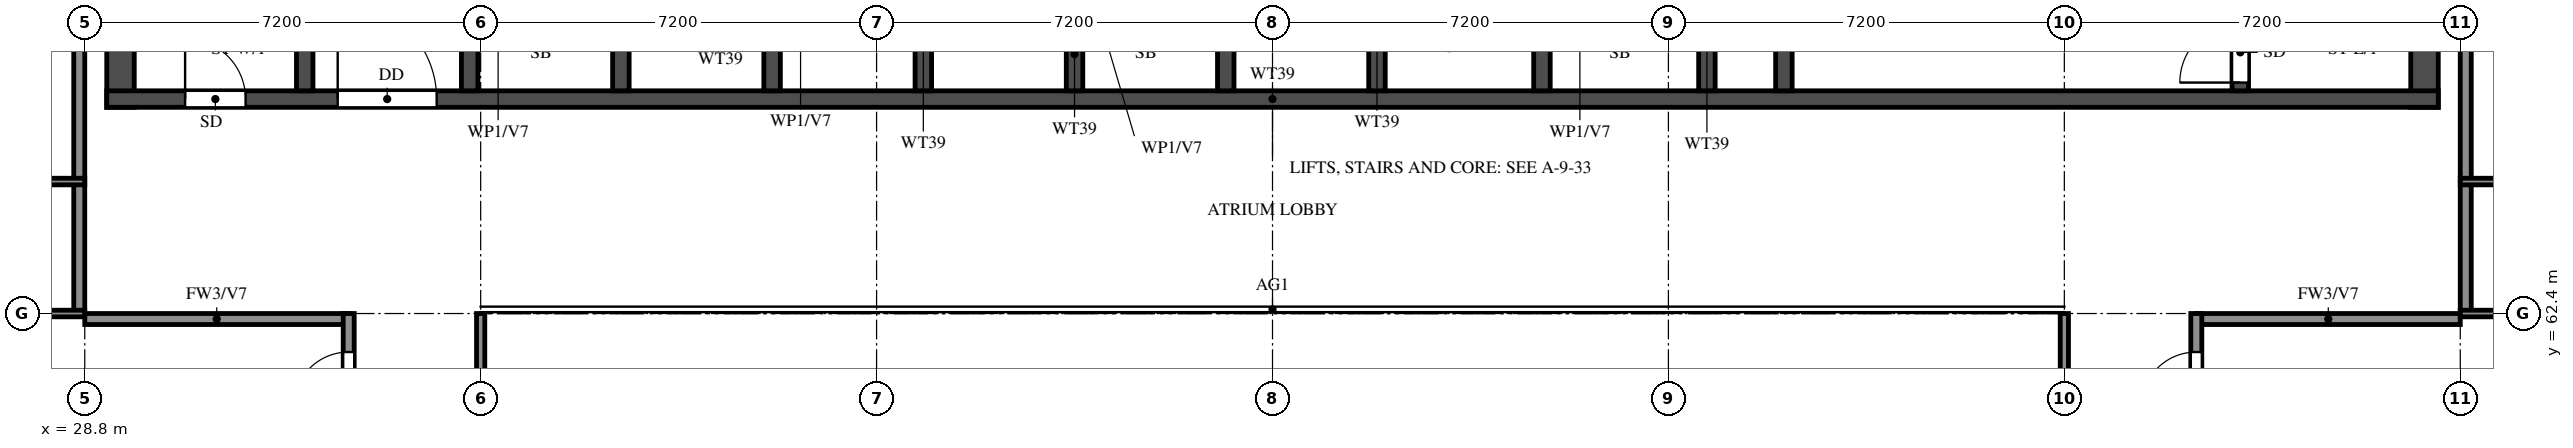
"""IFC4 building model, lengths in metres.
Left out: names, types, materials, properties, quantities, classifications, styles, units other than length and angle.
Written with IfcOpenShell. Run it as: python <this file> out.ifc"""

import sys

from ifc_helpers import new_model, si_unit, direction, frame, frame_2d, origin, place, context, subcontext, project, spatial, rectangle, extrude, element, fill, save


model = new_model("IFC4")
c1 = context("Model", 3, precision=1e-05, world=origin(), true_north=direction((0.0, 1.0)))
c2 = subcontext(c1, "Body", "Model", "MODEL_VIEW")
j1 = project(units=[si_unit("LENGTHUNIT", "METRE"), si_unit("PLANEANGLEUNIT", "RADIAN")], contexts=[c1])
p1 = place(None, origin())
s1 = spatial("IfcSite", under=j1, at=p1, CompositionType="ELEMENT")
p2 = place(p1, origin())
s2 = spatial("IfcBuilding", under=s1, at=p2, CompositionType="ELEMENT")
p3 = place(p2, frame((0.0, 0.0, 267.5)))
s3 = spatial("IfcBuildingStorey", under=s2, at=p3, CompositionType="ELEMENT", Elevation=267.5)
for number, where, z_axis, x_axis in (
    (1, (29.45, 66.15, 0.0), (0.0, 0.0, 1.0), (0.0, 1.0, 0.0)),
    (2, (71.35, 66.15, 0.0), (0.0, 0.0, 1.0), (0.0, 1.0, 0.0)),
):
    element("IfcWall", number, at=place(p3, frame(where, z_axis=z_axis, x_axis=x_axis)), inside=s3, PredefinedType="SHEAR", context=c2, shape_type="SweptSolid", body=[
        extrude(rectangle(XDim=11.85, YDim=0.5, at=frame_2d((5.925, 0.0))), origin(), (0.0, 0.0, 1.0), 3.099),
    ])
p4 = place(p3, frame((29.2, 66.3, 0.0), z_axis=(0.0, 0.0, 1.0), x_axis=(1.0, 0.0, 0.0)))
e3 = element("IfcWall", 3, at=p4, inside=s3, PredefinedType="SHEAR", context=c2, shape_type="SweptSolid", body=[
    extrude(rectangle(XDim=42.4, YDim=0.3, at=frame_2d((21.2, 0.0))), origin(), (0.0, 0.0, 1.0), 3.099),
])
p5 = place(p4, frame((1.425, 0.0, 0.0)))
e4 = element("IfcOpeningElement", 4, at=p5, cuts=e3, PredefinedType="OPENING", context=c2, shape_type="SweptSolid", body=[
    extrude(rectangle(XDim=1.1, YDim=2.1, at=frame_2d((0.55, 1.05))), frame((0.0, 0.16, 0.0), z_axis=(0.0, -1.0, 0.0), x_axis=(1.0, 0.0, 0.0)), (0.0, 0.0, 1.0), 0.32),
])
p6 = place(p4, frame((4.2, 0.0, 0.0)))
e5 = element("IfcOpeningElement", 5, at=p6, cuts=e3, PredefinedType="OPENING", context=c2, shape_type="SweptSolid", body=[
    extrude(rectangle(XDim=1.8, YDim=2.1, at=frame_2d((0.9, 1.05))), frame((0.0, 0.16, 0.0), z_axis=(0.0, -1.0, 0.0), x_axis=(1.0, 0.0, 0.0)), (0.0, 0.0, 1.0), 0.32),
])
p7 = place(p3, frame((32.8, 66.45, 0.0), z_axis=(0.0, 0.0, 1.0), x_axis=(0.0, 1.0, 0.0)))
e6 = element("IfcWall", 6, at=p7, inside=s3, PredefinedType="SHEAR", context=c2, shape_type="SweptSolid", body=[
    extrude(rectangle(XDim=11.05, YDim=0.3, at=frame_2d((5.525, 0.0))), origin(), (0.0, 0.0, 1.0), 3.099),
])
p8 = place(p3, frame((68.0, 66.45, 0.0), z_axis=(0.0, 0.0, 1.0), x_axis=(0.0, 1.0, 0.0)))
e7 = element("IfcWall", 7, at=p8, inside=s3, PredefinedType="SHEAR", context=c2, shape_type="SweptSolid", body=[
    extrude(rectangle(XDim=11.05, YDim=0.3, at=frame_2d((5.525, 0.0))), origin(), (0.0, 0.0, 1.0), 3.099),
])
p9 = place(p8, frame((0.15, 0.0, 0.0)))
e8 = element("IfcOpeningElement", 8, at=p9, cuts=e7, PredefinedType="OPENING", context=c2, shape_type="SweptSolid", body=[
    extrude(rectangle(XDim=1.1, YDim=2.1, at=frame_2d((0.55, 1.05))), frame((0.0, 0.16, 0.0), z_axis=(0.0, -1.0, 0.0), x_axis=(1.0, 0.0, 0.0)), (0.0, 0.0, 1.0), 0.32),
])
p10 = place(p3, frame((59.7, 66.45, 0.0), z_axis=(0.0, 0.0, 1.0), x_axis=(0.0, 1.0, 0.0)))
e9 = element("IfcWall", 9, at=p10, inside=s3, PredefinedType="SHEAR", context=c2, shape_type="SweptSolid", body=[
    extrude(rectangle(XDim=6.175, YDim=0.3, at=frame_2d((3.087, 0.0))), origin(), (0.0, 0.0, 1.0), 3.099),
])
p11 = place(p10, frame((3.85, 0.0, 0.0)))
e10 = element("IfcOpeningElement", 10, at=p11, cuts=e9, PredefinedType="OPENING", context=c2, shape_type="SweptSolid", body=[
    extrude(rectangle(XDim=1.2, YDim=2.1, at=frame_2d((0.6, 1.05))), frame((0.0, 0.16, 0.0), z_axis=(0.0, -1.0, 0.0), x_axis=(1.0, 0.0, 0.0)), (0.0, 0.0, 1.0), 0.32),
])
for number, where, z_axis, x_axis in (
    (11, (35.8, 66.45, 0.0), (0.0, 0.0, 1.0), (0.0, 1.0, 0.0)),
    (12, (38.55, 66.45, 0.0), (0.0, 0.0, 1.0), (0.0, 1.0, 0.0)),
    (13, (41.3, 66.45, 0.0), (0.0, 0.0, 1.0), (0.0, 1.0, 0.0)),
    (14, (44.05, 66.45, 0.0), (0.0, 0.0, 1.0), (0.0, 1.0, 0.0)),
    (15, (46.8, 66.45, 0.0), (0.0, 0.0, 1.0), (0.0, 1.0, 0.0)),
    (16, (49.55, 66.45, 0.0), (0.0, 0.0, 1.0), (0.0, 1.0, 0.0)),
    (17, (52.3, 66.45, 0.0), (0.0, 0.0, 1.0), (0.0, 1.0, 0.0)),
    (18, (55.3, 66.45, 0.0), (0.0, 0.0, 1.0), (0.0, 1.0, 0.0)),
    (19, (58.3, 66.45, 0.0), (0.0, 0.0, 1.0), (0.0, 1.0, 0.0)),
):
    element("IfcWall", number, at=place(p3, frame(where, z_axis=z_axis, x_axis=x_axis)), inside=s3, PredefinedType="SHEAR", context=c2, shape_type="SweptSolid", body=[
        extrude(rectangle(XDim=2.425, YDim=0.3, at=frame_2d((1.212, 0.0))), origin(), (0.0, 0.0, 1.0), 3.099),
    ])
for number, where, z_axis, x_axis in (
    (20, (28.8, 62.3, 0.0), (0.0, 0.0, 1.0), (1.0, 0.0, 0.0)),
    (21, (67.2, 62.3, 0.0), (0.0, 0.0, 1.0), (1.0, 0.0, 0.0)),
):
    element("IfcWall", number, at=place(p3, frame(where, z_axis=z_axis, x_axis=x_axis)), inside=s3, PredefinedType="SOLIDWALL", context=c2, shape_type="SweptSolid", body=[
        extrude(rectangle(XDim=4.8, YDim=0.2, at=frame_2d((2.4, 0.0))), origin(), (0.0, 0.0, 1.0), 3.099),
    ])
p12 = place(p3, frame((28.7, 62.4, 0.0), z_axis=(0.0, 0.0, 1.0), x_axis=(0.0, 1.0, 0.0)))
e22 = element("IfcWall", 22, at=p12, inside=s3, PredefinedType="SOLIDWALL", context=c2, shape_type="SweptSolid", body=[
    extrude(rectangle(XDim=15.6, YDim=0.2, at=frame_2d((7.8, 0.0))), origin(), (0.0, 0.0, 1.0), 3.099),
])
p13 = place(p3, frame((33.6, 45.6, 0.0), z_axis=(0.0, 0.0, 1.0), x_axis=(0.0, 1.0, 0.0)))
e23 = element("IfcWall", 23, at=p13, inside=s3, PredefinedType="SOLIDWALL", context=c2, shape_type="SweptSolid", body=[
    extrude(rectangle(XDim=16.8, YDim=0.2, at=frame_2d((8.4, 0.0))), origin(), (0.0, 0.0, 1.0), 3.099),
])
p14 = place(p13, frame((0.7, 0.0, 0.0)))
e24 = element("IfcOpeningElement", 24, at=p14, cuts=e23, PredefinedType="OPENING", context=c2, shape_type="SweptSolid", body=[
    extrude(rectangle(XDim=1.0, YDim=2.1, at=frame_2d((0.5, 1.05))), frame((0.0, 0.11, 0.0), z_axis=(0.0, -1.0, 0.0), x_axis=(1.0, 0.0, 0.0)), (0.0, 0.0, 1.0), 0.22),
])
p15 = place(p13, frame((8.3, 0.0, 0.0)))
e25 = element("IfcOpeningElement", 25, at=p15, cuts=e23, PredefinedType="OPENING", context=c2, shape_type="SweptSolid", body=[
    extrude(rectangle(XDim=1.0, YDim=2.1, at=frame_2d((0.5, 1.05))), frame((0.0, 0.11, 0.0), z_axis=(0.0, -1.0, 0.0), x_axis=(1.0, 0.0, 0.0)), (0.0, 0.0, 1.0), 0.22),
])
p16 = place(p13, frame((15.1, 0.0, 0.0)))
e26 = element("IfcOpeningElement", 26, at=p16, cuts=e23, PredefinedType="OPENING", context=c2, shape_type="SweptSolid", body=[
    extrude(rectangle(XDim=1.0, YDim=2.1, at=frame_2d((0.5, 1.05))), frame((0.0, 0.11, 0.0), z_axis=(0.0, -1.0, 0.0), x_axis=(1.0, 0.0, 0.0)), (0.0, 0.0, 1.0), 0.22),
])
p17 = place(p3, frame((67.2, 45.6, 0.0), z_axis=(0.0, 0.0, 1.0), x_axis=(0.0, 1.0, 0.0)))
e27 = element("IfcWall", 27, at=p17, inside=s3, PredefinedType="SOLIDWALL", context=c2, shape_type="SweptSolid", body=[
    extrude(rectangle(XDim=16.8, YDim=0.2, at=frame_2d((8.4, 0.0))), origin(), (0.0, 0.0, 1.0), 3.099),
])
p18 = place(p17, frame((8.3, 0.0, 0.0)))
e28 = element("IfcOpeningElement", 28, at=p18, cuts=e27, PredefinedType="OPENING", context=c2, shape_type="SweptSolid", body=[
    extrude(rectangle(XDim=1.0, YDim=2.1, at=frame_2d((0.5, 1.05))), frame((0.0, 0.11, 0.0), z_axis=(0.0, -1.0, 0.0), x_axis=(1.0, 0.0, 0.0)), (0.0, 0.0, 1.0), 0.22),
])
p19 = place(p17, frame((15.1, 0.0, 0.0)))
e29 = element("IfcOpeningElement", 29, at=p19, cuts=e27, PredefinedType="OPENING", context=c2, shape_type="SweptSolid", body=[
    extrude(rectangle(XDim=1.0, YDim=2.1, at=frame_2d((0.5, 1.05))), frame((0.0, 0.11, 0.0), z_axis=(0.0, -1.0, 0.0), x_axis=(1.0, 0.0, 0.0)), (0.0, 0.0, 1.0), 0.22),
])
p20 = place(p17, frame((0.7, 0.0, 0.0)))
e30 = element("IfcOpeningElement", 30, at=p20, cuts=e27, PredefinedType="OPENING", context=c2, shape_type="SweptSolid", body=[
    extrude(rectangle(XDim=1.0, YDim=2.1, at=frame_2d((0.5, 1.05))), frame((0.0, 0.11, 0.0), z_axis=(0.0, -1.0, 0.0), x_axis=(1.0, 0.0, 0.0)), (0.0, 0.0, 1.0), 0.22),
])
p21 = place(p3, frame((72.1, 62.4, 0.0), z_axis=(0.0, 0.0, 1.0), x_axis=(0.0, 1.0, 0.0)))
e31 = element("IfcWall", 31, at=p21, inside=s3, PredefinedType="SOLIDWALL", context=c2, shape_type="SweptSolid", body=[
    extrude(rectangle(XDim=15.6, YDim=0.2, at=frame_2d((7.8, 0.0))), origin(), (0.0, 0.0, 1.0), 3.099),
])
p22 = place(p3, frame((26.4, 62.4, 0.0), z_axis=(0.0, 0.0, 1.0), x_axis=(1.0, 0.0, 0.0)))
e32 = element("IfcWall", 32, at=p22, inside=s3, PredefinedType="PARTITIONING", context=c2, shape_type="SweptSolid", body=[
    extrude(rectangle(XDim=2.4, YDim=0.12, at=frame_2d((1.2, 0.0))), origin(), (0.0, 0.0, 1.0), 3.099),
])
p23 = place(p22, frame((0.75, 0.0, 0.0)))
e33 = element("IfcOpeningElement", 33, at=p23, cuts=e32, PredefinedType="OPENING", context=c2, shape_type="SweptSolid", body=[
    extrude(rectangle(XDim=0.9, YDim=2.1, at=frame_2d((0.45, 1.05))), frame((0.0, 0.07, 0.0), z_axis=(0.0, -1.0, 0.0), x_axis=(1.0, 0.0, 0.0)), (0.0, 0.0, 1.0), 0.14),
])
p24 = place(p3, frame((72.0, 62.4, 0.0), z_axis=(0.0, 0.0, 1.0), x_axis=(1.0, 0.0, 0.0)))
e34 = element("IfcWall", 34, at=p24, inside=s3, PredefinedType="PARTITIONING", context=c2, shape_type="SweptSolid", body=[
    extrude(rectangle(XDim=2.4, YDim=0.12, at=frame_2d((1.2, 0.0))), origin(), (0.0, 0.0, 1.0), 3.099),
])
p25 = place(p24, frame((0.75, 0.0, 0.0)))
e35 = element("IfcOpeningElement", 35, at=p25, cuts=e34, PredefinedType="OPENING", context=c2, shape_type="SweptSolid", body=[
    extrude(rectangle(XDim=0.9, YDim=2.1, at=frame_2d((0.45, 1.05))), frame((0.0, 0.07, 0.0), z_axis=(0.0, -1.0, 0.0), x_axis=(1.0, 0.0, 0.0)), (0.0, 0.0, 1.0), 0.14),
])
p26 = place(p3, frame((25.3, 64.8, 0.0), z_axis=(0.0, 0.0, 1.0), x_axis=(1.0, 0.0, 0.0)))
e36 = element("IfcWall", 36, at=p26, inside=s3, PredefinedType="PARTITIONING", context=c2, shape_type="SweptSolid", body=[
    extrude(rectangle(XDim=3.5, YDim=0.12, at=frame_2d((1.75, 0.0))), origin(), (0.0, 0.0, 1.0), 3.099),
])
p27 = place(p26, frame((1.3, 0.0, 0.0)))
e37 = element("IfcOpeningElement", 37, at=p27, cuts=e36, PredefinedType="OPENING", context=c2, shape_type="SweptSolid", body=[
    extrude(rectangle(XDim=0.9, YDim=2.1, at=frame_2d((0.45, 1.05))), frame((0.0, 0.07, 0.0), z_axis=(0.0, -1.0, 0.0), x_axis=(1.0, 0.0, 0.0)), (0.0, 0.0, 1.0), 0.14),
])
p28 = place(p3, frame((72.0, 64.8, 0.0), z_axis=(0.0, 0.0, 1.0), x_axis=(1.0, 0.0, 0.0)))
e38 = element("IfcWall", 38, at=p28, inside=s3, PredefinedType="PARTITIONING", context=c2, shape_type="SweptSolid", body=[
    extrude(rectangle(XDim=3.5, YDim=0.12, at=frame_2d((1.75, 0.0))), origin(), (0.0, 0.0, 1.0), 3.099),
])
p29 = place(p28, frame((1.3, 0.0, 0.0)))
e39 = element("IfcOpeningElement", 39, at=p29, cuts=e38, PredefinedType="OPENING", context=c2, shape_type="SweptSolid", body=[
    extrude(rectangle(XDim=0.9, YDim=2.1, at=frame_2d((0.45, 1.05))), frame((0.0, 0.07, 0.0), z_axis=(0.0, -1.0, 0.0), x_axis=(1.0, 0.0, 0.0)), (0.0, 0.0, 1.0), 0.14),
])
for number, where, z_axis, x_axis in (
    (40, (36.0, 48.0, 0.0), (0.0, 0.0, 1.0), (0.0, 1.0, 0.0)),
    (41, (64.8, 48.0, 0.0), (0.0, 0.0, 1.0), (0.0, 1.0, 0.0)),
):
    element("IfcWall", number, at=place(p3, frame(where, z_axis=z_axis, x_axis=x_axis)), inside=s3, PredefinedType="SOLIDWALL", context=c2, shape_type="SweptSolid", body=[
        extrude(rectangle(XDim=14.4, YDim=0.15, at=frame_2d((7.2, 0.0))), origin(), (0.0, 0.0, 1.0), 2.199),
    ])
p30 = place(p5, origin())
e42 = element("IfcDoor", 42, at=p30, inside=s3, OperationType="SINGLE_SWING_LEFT", PredefinedType="DOOR", context=c2, shape_type="SweptSolid", body=[
    extrude(rectangle(XDim=1.1, YDim=2.1, at=frame_2d((0.55, 1.05))), frame((0.0, 0.025, 0.0), z_axis=(0.0, -1.0, 0.0), x_axis=(1.0, 0.0, 0.0)), (0.0, 0.0, 1.0), 0.05),
])
fill(e4, e42)
p31 = place(p9, origin())
e43 = element("IfcDoor", 43, at=p31, inside=s3, OperationType="SINGLE_SWING_RIGHT", PredefinedType="DOOR", context=c2, shape_type="SweptSolid", body=[
    extrude(rectangle(XDim=1.1, YDim=2.1, at=frame_2d((0.55, 1.05))), frame((0.0, 0.025, 0.0), z_axis=(0.0, -1.0, 0.0), x_axis=(1.0, 0.0, 0.0)), (0.0, 0.0, 1.0), 0.05),
])
fill(e8, e43)
p32 = place(p6, origin())
e44 = element("IfcDoor", 44, at=p32, inside=s3, OperationType="DOUBLE_DOOR_SINGLE_SWING", PredefinedType="DOOR", context=c2, shape_type="SweptSolid", body=[
    extrude(rectangle(XDim=1.8, YDim=2.1, at=frame_2d((0.9, 1.05))), frame((0.0, 0.025, 0.0), z_axis=(0.0, -1.0, 0.0), x_axis=(1.0, 0.0, 0.0)), (0.0, 0.0, 1.0), 0.05),
])
fill(e5, e44)
p33 = place(p16, origin())
e45 = element("IfcDoor", 45, at=p33, inside=s3, OperationType="SINGLE_SWING_LEFT", PredefinedType="DOOR", context=c2, shape_type="SweptSolid", body=[
    extrude(rectangle(XDim=1.0, YDim=2.1, at=frame_2d((0.5, 1.05))), frame((0.0, 0.025, 0.0), z_axis=(0.0, -1.0, 0.0), x_axis=(1.0, 0.0, 0.0)), (0.0, 0.0, 1.0), 0.05),
])
fill(e26, e45)
p34 = place(p19, origin())
e46 = element("IfcDoor", 46, at=p34, inside=s3, OperationType="SINGLE_SWING_RIGHT", PredefinedType="DOOR", context=c2, shape_type="SweptSolid", body=[
    extrude(rectangle(XDim=1.0, YDim=2.1, at=frame_2d((0.5, 1.05))), frame((0.0, 0.025, 0.0), z_axis=(0.0, -1.0, 0.0), x_axis=(1.0, 0.0, 0.0)), (0.0, 0.0, 1.0), 0.05),
])
fill(e29, e46)
save(model, sys.argv[1])
